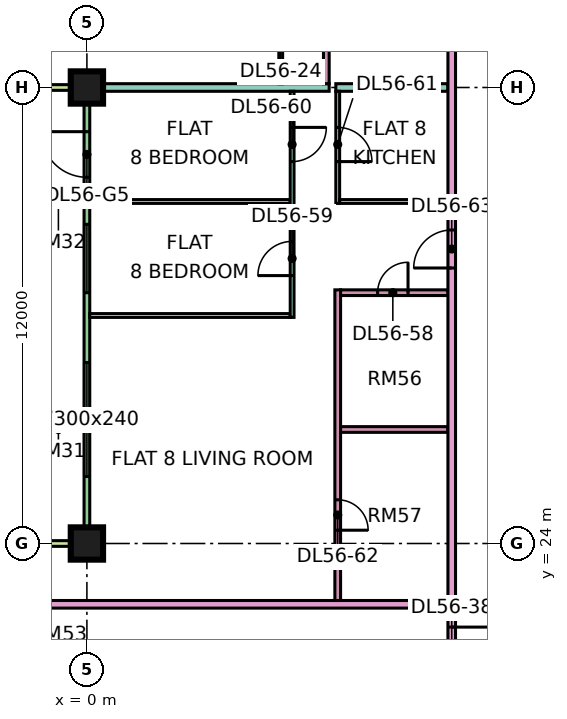
"""IFC4 building model, lengths in metres.
Left out: names, types, materials, properties, quantities, classifications, styles, units other than length and angle.
Written with IfcOpenShell. Run it as: python <this file> out.ifc"""

import sys

from ifc_helpers import new_model, si_unit, direction, frame, frame_2d, origin, origin_2d, place, context, subcontext, project, spatial, rectangle, extrude, element, fill, save


model = new_model("IFC4")
c1 = context("Model", 3, precision=1e-05, world=origin(), true_north=direction((0.0, 1.0)))
c2 = subcontext(c1, "Body", "Model", "MODEL_VIEW")
j1 = project(units=[si_unit("LENGTHUNIT", "METRE"), si_unit("PLANEANGLEUNIT", "RADIAN")], contexts=[c1])
p1 = place(None, origin())
s1 = spatial("IfcSite", under=j1, at=p1, CompositionType="ELEMENT")
p2 = place(p1, origin())
s2 = spatial("IfcBuilding", under=s1, at=p2, CompositionType="ELEMENT")
p3 = place(p2, frame((0.0, 0.0, 237.9)))
s3 = spatial("IfcBuildingStorey", under=s2, at=p3, CompositionType="ELEMENT", Elevation=237.9)
p4 = place(p3, frame((0.0, 24.0, 0.0), z_axis=(0.0, 0.0, 1.0), x_axis=(1.0, 0.0, 0.0)))
e1 = element("IfcColumn", 1, at=p4, inside=s3, PredefinedType="COLUMN", context=c2, shape_type="SweptSolid", body=[
    extrude(rectangle(XDim=0.85, YDim=0.85, at=origin_2d()), origin(), (0.0, 0.0, 1.0), 3.75),
])
p5 = place(p3, frame((0.0, 36.0, 0.0), z_axis=(0.0, 0.0, 1.0), x_axis=(1.0, 0.0, 0.0)))
e2 = element("IfcColumn", 2, at=p5, inside=s3, PredefinedType="COLUMN", context=c2, shape_type="SweptSolid", body=[
    extrude(rectangle(XDim=0.85, YDim=0.85, at=origin_2d()), origin(), (0.0, 0.0, 1.0), 3.75),
])
p6 = place(p3, frame((0.0, 35.925, 0.0), z_axis=(0.0, 0.0, 1.0), x_axis=(0.0, -1.0, 0.0)))
e3 = element("IfcWall", 3, at=p6, inside=s3, PredefinedType="SOLIDWALL", context=c2, shape_type="SweptSolid", body=[
    extrude(rectangle(XDim=11.85, YDim=0.15, at=frame_2d((5.925, 0.0))), origin(), (0.0, 0.0, 1.0), 3.35),
])
p7 = place(p6, frame((1.087, 0.0, 0.0)))
e4 = element("IfcOpeningElement", 4, at=p7, cuts=e3, PredefinedType="OPENING", context=c2, shape_type="SweptSolid", body=[
    extrude(rectangle(XDim=1.2, YDim=2.4, at=frame_2d((0.6, 1.2))), frame((0.0, 0.085, 0.0), z_axis=(0.0, -1.0, 0.0), x_axis=(1.0, 0.0, 0.0)), (0.0, 0.0, 1.0), 0.17),
])
p8 = place(p6, frame((3.525, 0.0, 0.45)))
e5 = element("IfcOpeningElement", 5, at=p8, cuts=e3, PredefinedType="OPENING", context=c2, shape_type="SweptSolid", body=[
    extrude(rectangle(XDim=1.8, YDim=2.4, at=frame_2d((0.9, 1.2))), frame((0.0, 0.085, 0.0), z_axis=(0.0, -1.0, 0.0), x_axis=(1.0, 0.0, 0.0)), (0.0, 0.0, 1.0), 0.17),
])
p9 = place(p6, frame((7.163, 0.0, 0.45)))
e6 = element("IfcOpeningElement", 6, at=p9, cuts=e3, PredefinedType="OPENING", context=c2, shape_type="SweptSolid", body=[
    extrude(rectangle(XDim=3.0, YDim=2.4, at=frame_2d((1.5, 1.2))), frame((0.0, 0.085, 0.0), z_axis=(0.0, -1.0, 0.0), x_axis=(1.0, 0.0, 0.0)), (0.0, 0.0, 1.0), 0.17),
])
for number, where, z_axis, x_axis in (
    (7, (-1.5, 36.0, 0.0), (0.0, 0.0, 1.0), (1.0, 0.0, 0.0)),
    (8, (-1.5, 24.0, 0.0), (0.0, 0.0, 1.0), (1.0, 0.0, 0.0)),
):
    element("IfcWall", number, at=place(p3, frame(where, z_axis=z_axis, x_axis=x_axis)), inside=s3, PredefinedType="SOLIDWALL", context=c2, shape_type="SweptSolid", body=[
        extrude(rectangle(XDim=1.5, YDim=0.15, at=frame_2d((0.75, 0.0))), origin(), (0.0, 0.0, 1.0), 3.35),
    ])
p10 = place(p3, frame((-1.35, 22.4, 0.0), z_axis=(0.0, 0.0, 1.0), x_axis=(1.0, 0.0, 0.0)))
e9 = element("IfcWall", 9, at=p10, inside=s3, PredefinedType="PARTITIONING", context=c2, shape_type="SweptSolid", body=[
    extrude(rectangle(XDim=10.85, YDim=0.2, at=frame_2d((5.425, 0.0))), origin(), (0.0, 0.0, 1.0), 3.35),
])
e10 = element("IfcWall", 10, at=p5, inside=s3, PredefinedType="PARTITIONING", context=c2, shape_type="SweptSolid", body=[
    extrude(rectangle(XDim=6.375, YDim=0.2, at=frame_2d((3.188, 0.0))), origin(), (0.0, 0.0, 1.0), 3.35),
])
for number, where, z_axis, x_axis in (
    (11, (0.074, 30.0, 0.0), (0.0, 0.0, 1.0), (1.0, 0.0, 0.0)),
    (12, (0.074, 33.0, 0.0), (0.0, 0.0, 1.0), (1.0, 0.0, 0.0)),
):
    element("IfcWall", number, at=place(p3, frame(where, z_axis=z_axis, x_axis=x_axis)), inside=s3, PredefinedType="PARTITIONING", context=c2, shape_type="SweptSolid", body=[
        extrude(rectangle(XDim=5.276, YDim=0.1, at=frame_2d((2.638, 0.0))), origin(), (0.0, 0.0, 1.0), 3.35),
    ])
p11 = place(p3, frame((5.1, 36.1, 0.0), z_axis=(0.0, 0.0, 1.0), x_axis=(0.0, 1.0, 0.0)))
e13 = element("IfcWall", 13, at=p11, inside=s3, PredefinedType="PARTITIONING", context=c2, shape_type="SweptSolid", body=[
    extrude(rectangle(XDim=2.85, YDim=0.1, at=frame_2d((1.425, 0.0))), origin(), (0.0, 0.0, 1.0), 3.35),
])
p12 = place(p11, frame((0.95, 0.0, 0.0)))
e14 = element("IfcOpeningElement", 14, at=p12, cuts=e13, PredefinedType="OPENING", context=c2, shape_type="SweptSolid", body=[
    extrude(rectangle(XDim=0.9, YDim=2.1, at=frame_2d((0.45, 1.05))), frame((0.0, 0.06, 0.0), z_axis=(0.0, -1.0, 0.0), x_axis=(1.0, 0.0, 0.0)), (0.0, 0.0, 1.0), 0.12),
])
p13 = place(p3, frame((5.4, 29.95, 0.0), z_axis=(0.0, 0.0, 1.0), x_axis=(0.0, 1.0, 0.0)))
e15 = element("IfcWall", 15, at=p13, inside=s3, PredefinedType="PARTITIONING", context=c2, shape_type="SweptSolid", body=[
    extrude(rectangle(XDim=5.95, YDim=0.1, at=frame_2d((2.975, 0.0))), origin(), (0.0, 0.0, 1.0), 3.35),
])
p14 = place(p13, frame((1.1, 0.0, 0.0)))
e16 = element("IfcOpeningElement", 16, at=p14, cuts=e15, PredefinedType="OPENING", context=c2, shape_type="SweptSolid", body=[
    extrude(rectangle(XDim=0.9, YDim=2.1, at=frame_2d((0.45, 1.05))), frame((0.0, 0.06, 0.0), z_axis=(0.0, -1.0, 0.0), x_axis=(1.0, 0.0, 0.0)), (0.0, 0.0, 1.0), 0.12),
])
p15 = place(p13, frame((4.1, 0.0, 0.0)))
e17 = element("IfcOpeningElement", 17, at=p15, cuts=e15, PredefinedType="OPENING", context=c2, shape_type="SweptSolid", body=[
    extrude(rectangle(XDim=0.9, YDim=2.1, at=frame_2d((0.45, 1.05))), frame((0.0, 0.06, 0.0), z_axis=(0.0, -1.0, 0.0), x_axis=(1.0, 0.0, 0.0)), (0.0, 0.0, 1.0), 0.12),
])
p16 = place(p3, frame((6.3, 36.1, 0.0), z_axis=(0.0, 0.0, 1.0), x_axis=(0.0, 1.0, 0.0)))
e18 = element("IfcWall", 18, at=p16, inside=s3, PredefinedType="PARTITIONING", context=c2, shape_type="SweptSolid", body=[
    extrude(rectangle(XDim=11.975, YDim=0.15, at=frame_2d((5.987, 0.0))), origin(), (0.0, 0.0, 1.0), 3.35),
])
p17 = place(p16, frame((6.95, 0.0, 0.0)))
e19 = element("IfcOpeningElement", 19, at=p17, cuts=e18, PredefinedType="OPENING", context=c2, shape_type="SweptSolid", body=[
    extrude(rectangle(XDim=0.8, YDim=2.1, at=frame_2d((0.4, 1.05))), frame((0.0, 0.085, 0.0), z_axis=(0.0, -1.0, 0.0), x_axis=(1.0, 0.0, 0.0)), (0.0, 0.0, 1.0), 0.17),
])
p18 = place(p16, frame((2.15, 0.0, 0.0)))
e20 = element("IfcOpeningElement", 20, at=p18, cuts=e18, PredefinedType="OPENING", context=c2, shape_type="SweptSolid", body=[
    extrude(rectangle(XDim=0.9, YDim=2.1, at=frame_2d((0.45, 1.05))), frame((0.0, 0.085, 0.0), z_axis=(0.0, -1.0, 0.0), x_axis=(1.0, 0.0, 0.0)), (0.0, 0.0, 1.0), 0.17),
])
p19 = place(p16, frame((10.25, 0.0, 0.0)))
e21 = element("IfcOpeningElement", 21, at=p19, cuts=e18, PredefinedType="OPENING", context=c2, shape_type="SweptSolid", body=[
    extrude(rectangle(XDim=0.8, YDim=2.1, at=frame_2d((0.4, 1.05))), frame((0.0, 0.085, 0.0), z_axis=(0.0, -1.0, 0.0), x_axis=(1.0, 0.0, 0.0)), (0.0, 0.0, 1.0), 0.17),
])
p20 = place(p3, frame((6.55, 36.0, 0.0), z_axis=(0.0, 0.0, 1.0), x_axis=(1.0, 0.0, 0.0)))
e22 = element("IfcWall", 22, at=p20, inside=s3, PredefinedType="PARTITIONING", context=c2, shape_type="SweptSolid", body=[
    extrude(rectangle(XDim=2.95, YDim=0.2, at=frame_2d((1.475, 0.0))), origin(), (0.0, 0.0, 1.0), 3.35),
])
p21 = place(p3, frame((6.6, 22.5, 0.0), z_axis=(0.0, 0.0, 1.0), x_axis=(0.0, 1.0, 0.0)))
e23 = element("IfcWall", 23, at=p21, inside=s3, PredefinedType="PARTITIONING", context=c2, shape_type="SweptSolid", body=[
    extrude(rectangle(XDim=8.175, YDim=0.15, at=frame_2d((4.087, 0.0))), origin(), (0.0, 0.0, 1.0), 3.35),
])
p22 = place(p21, frame((1.85, 0.0, 0.0)))
e24 = element("IfcOpeningElement", 24, at=p22, cuts=e23, PredefinedType="OPENING", context=c2, shape_type="SweptSolid", body=[
    extrude(rectangle(XDim=0.8, YDim=2.1, at=frame_2d((0.4, 1.05))), frame((0.0, 0.085, 0.0), z_axis=(0.0, -1.0, 0.0), x_axis=(1.0, 0.0, 0.0)), (0.0, 0.0, 1.0), 0.17),
])
p23 = place(p3, frame((6.6, 32.95, 0.0), z_axis=(0.0, 0.0, 1.0), x_axis=(0.0, 1.0, 0.0)))
e25 = element("IfcWall", 25, at=p23, inside=s3, PredefinedType="PARTITIONING", context=c2, shape_type="SweptSolid", body=[
    extrude(rectangle(XDim=2.95, YDim=0.1, at=frame_2d((1.475, 0.0))), origin(), (0.0, 0.0, 1.0), 3.35),
])
p24 = place(p23, frame((1.1, 0.0, 0.0)))
e26 = element("IfcOpeningElement", 26, at=p24, cuts=e25, PredefinedType="OPENING", context=c2, shape_type="SweptSolid", body=[
    extrude(rectangle(XDim=0.9, YDim=2.1, at=frame_2d((0.45, 1.05))), frame((0.0, 0.06, 0.0), z_axis=(0.0, -1.0, 0.0), x_axis=(1.0, 0.0, 0.0)), (0.0, 0.0, 1.0), 0.12),
])
p25 = place(p3, frame((6.65, 33.0, 0.0), z_axis=(0.0, 0.0, 1.0), x_axis=(1.0, 0.0, 0.0)))
e27 = element("IfcWall", 27, at=p25, inside=s3, PredefinedType="PARTITIONING", context=c2, shape_type="SweptSolid", body=[
    extrude(rectangle(XDim=2.85, YDim=0.1, at=frame_2d((1.425, 0.0))), origin(), (0.0, 0.0, 1.0), 3.35),
])
p26 = place(p3, frame((6.675, 27.0, 0.0), z_axis=(0.0, 0.0, 1.0), x_axis=(1.0, 0.0, 0.0)))
e28 = element("IfcWall", 28, at=p26, inside=s3, PredefinedType="PARTITIONING", context=c2, shape_type="SweptSolid", body=[
    extrude(rectangle(XDim=2.825, YDim=0.15, at=frame_2d((1.413, 0.0))), origin(), (0.0, 0.0, 1.0), 3.35),
])
p27 = place(p3, frame((6.675, 30.6, 0.0), z_axis=(0.0, 0.0, 1.0), x_axis=(1.0, 0.0, 0.0)))
e29 = element("IfcWall", 29, at=p27, inside=s3, PredefinedType="PARTITIONING", context=c2, shape_type="SweptSolid", body=[
    extrude(rectangle(XDim=2.825, YDim=0.15, at=frame_2d((1.413, 0.0))), origin(), (0.0, 0.0, 1.0), 3.35),
])
p28 = place(p27, frame((0.975, 0.0, 0.0)))
e30 = element("IfcOpeningElement", 30, at=p28, cuts=e29, PredefinedType="OPENING", context=c2, shape_type="SweptSolid", body=[
    extrude(rectangle(XDim=0.8, YDim=2.1, at=frame_2d((0.4, 1.05))), frame((0.0, 0.085, 0.0), z_axis=(0.0, -1.0, 0.0), x_axis=(1.0, 0.0, 0.0)), (0.0, 0.0, 1.0), 0.17),
])
p29 = place(p3, frame((9.6, 20.0, 0.0), z_axis=(0.0, 0.0, 1.0), x_axis=(0.0, 1.0, 0.0)))
e31 = element("IfcWall", 31, at=p29, inside=s3, PredefinedType="PARTITIONING", context=c2, shape_type="SweptSolid", body=[
    extrude(rectangle(XDim=42.926, YDim=0.2, at=frame_2d((21.463, 0.0))), origin(), (0.0, 0.0, 1.0), 3.35),
])
p30 = place(p29, frame((28.95, 0.0, 0.0)))
e32 = element("IfcOpeningElement", 32, at=p30, cuts=e31, PredefinedType="OPENING", context=c2, shape_type="SweptSolid", body=[
    extrude(rectangle(XDim=1.0, YDim=2.1, at=frame_2d((0.5, 1.05))), frame((0.0, 0.11, 0.0), z_axis=(0.0, -1.0, 0.0), x_axis=(1.0, 0.0, 0.0)), (0.0, 0.0, 1.0), 0.22),
])
p31 = place(p29, frame((31.95, 0.0, 0.0)))
e33 = element("IfcOpeningElement", 33, at=p31, cuts=e31, PredefinedType="OPENING", context=c2, shape_type="SweptSolid", body=[
    extrude(rectangle(XDim=1.0, YDim=2.1, at=frame_2d((0.5, 1.05))), frame((0.0, 0.11, 0.0), z_axis=(0.0, -1.0, 0.0), x_axis=(1.0, 0.0, 0.0)), (0.0, 0.0, 1.0), 0.22),
])
p32 = place(p29, frame((0.6, 0.0, 0.0)))
e34 = element("IfcOpeningElement", 34, at=p32, cuts=e31, PredefinedType="OPENING", context=c2, shape_type="SweptSolid", body=[
    extrude(rectangle(XDim=1.2, YDim=2.1, at=frame_2d((0.6, 1.05))), frame((0.0, 0.11, 0.0), z_axis=(0.0, -1.0, 0.0), x_axis=(1.0, 0.0, 0.0)), (0.0, 0.0, 1.0), 0.22),
])
p33 = place(p29, frame((11.25, 0.0, 0.0)))
e35 = element("IfcOpeningElement", 35, at=p33, cuts=e31, PredefinedType="OPENING", context=c2, shape_type="SweptSolid", body=[
    extrude(rectangle(XDim=1.0, YDim=2.1, at=frame_2d((0.5, 1.05))), frame((0.0, 0.11, 0.0), z_axis=(0.0, -1.0, 0.0), x_axis=(1.0, 0.0, 0.0)), (0.0, 0.0, 1.0), 0.22),
])
p34 = place(p7, frame((1.2, 0.0, 0.0), z_axis=(0.0, 0.0, 1.0), x_axis=(-1.0, 0.0, 0.0)))
e36 = element("IfcDoor", 36, at=p34, inside=s3, OperationType="DOUBLE_DOOR_SINGLE_SWING", PredefinedType="DOOR", context=c2, shape_type="SweptSolid", body=[
    extrude(rectangle(XDim=1.2, YDim=2.4, at=frame_2d((0.6, 1.2))), frame((0.0, 0.025, 0.0), z_axis=(0.0, -1.0, 0.0), x_axis=(1.0, 0.0, 0.0)), (0.0, 0.0, 1.0), 0.05),
])
fill(e4, e36)
p35 = place(p8, origin())
e37 = element("IfcWindow", 37, at=p35, inside=s3, PartitioningType="SINGLE_PANEL", PredefinedType="WINDOW", context=c2, shape_type="SweptSolid", body=[
    extrude(rectangle(XDim=1.8, YDim=2.4, at=frame_2d((0.9, 1.2))), frame((0.0, 0.03, 0.0), z_axis=(0.0, -1.0, 0.0), x_axis=(1.0, 0.0, 0.0)), (0.0, 0.0, 1.0), 0.06),
])
fill(e5, e37)
p36 = place(p9, origin())
e38 = element("IfcWindow", 38, at=p36, inside=s3, PartitioningType="SINGLE_PANEL", PredefinedType="WINDOW", context=c2, shape_type="SweptSolid", body=[
    extrude(rectangle(XDim=3.0, YDim=2.4, at=frame_2d((1.5, 1.2))), frame((0.0, 0.03, 0.0), z_axis=(0.0, -1.0, 0.0), x_axis=(1.0, 0.0, 0.0)), (0.0, 0.0, 1.0), 0.06),
])
fill(e6, e38)
p37 = place(p32, origin())
e39 = element("IfcDoor", 39, at=p37, inside=s3, OperationType="SINGLE_SWING_RIGHT", PredefinedType="DOOR", context=c2, shape_type="SweptSolid", body=[
    extrude(rectangle(XDim=1.2, YDim=2.1, at=frame_2d((0.6, 1.05))), frame((0.0, 0.025, 0.0), z_axis=(0.0, -1.0, 0.0), x_axis=(1.0, 0.0, 0.0)), (0.0, 0.0, 1.0), 0.05),
])
fill(e34, e39)
p38 = place(p28, frame((0.8, 0.0, 0.0), z_axis=(0.0, 0.0, 1.0), x_axis=(-1.0, 0.0, 0.0)))
e40 = element("IfcDoor", 40, at=p38, inside=s3, OperationType="SINGLE_SWING_RIGHT", PredefinedType="DOOR", context=c2, shape_type="SweptSolid", body=[
    extrude(rectangle(XDim=0.8, YDim=2.1, at=frame_2d((0.4, 1.05))), frame((0.0, 0.025, 0.0), z_axis=(0.0, -1.0, 0.0), x_axis=(1.0, 0.0, 0.0)), (0.0, 0.0, 1.0), 0.05),
])
fill(e30, e40)
p39 = place(p14, origin())
e41 = element("IfcDoor", 41, at=p39, inside=s3, OperationType="SINGLE_SWING_LEFT", PredefinedType="DOOR", context=c2, shape_type="SweptSolid", body=[
    extrude(rectangle(XDim=0.9, YDim=2.1, at=frame_2d((0.45, 1.05))), frame((0.0, 0.025, 0.0), z_axis=(0.0, -1.0, 0.0), x_axis=(1.0, 0.0, 0.0)), (0.0, 0.0, 1.0), 0.05),
])
fill(e16, e41)
p40 = place(p15, origin())
e42 = element("IfcDoor", 42, at=p40, inside=s3, OperationType="SINGLE_SWING_RIGHT", PredefinedType="DOOR", context=c2, shape_type="SweptSolid", body=[
    extrude(rectangle(XDim=0.9, YDim=2.1, at=frame_2d((0.45, 1.05))), frame((0.0, 0.025, 0.0), z_axis=(0.0, -1.0, 0.0), x_axis=(1.0, 0.0, 0.0)), (0.0, 0.0, 1.0), 0.05),
])
fill(e17, e42)
p41 = place(p24, frame((0.9, 0.0, 0.0), z_axis=(0.0, 0.0, 1.0), x_axis=(-1.0, 0.0, 0.0)))
e43 = element("IfcDoor", 43, at=p41, inside=s3, OperationType="SINGLE_SWING_LEFT", PredefinedType="DOOR", context=c2, shape_type="SweptSolid", body=[
    extrude(rectangle(XDim=0.9, YDim=2.1, at=frame_2d((0.45, 1.05))), frame((0.0, 0.025, 0.0), z_axis=(0.0, -1.0, 0.0), x_axis=(1.0, 0.0, 0.0)), (0.0, 0.0, 1.0), 0.05),
])
fill(e26, e43)
p42 = place(p22, frame((0.8, 0.0, 0.0), z_axis=(0.0, 0.0, 1.0), x_axis=(-1.0, 0.0, 0.0)))
e44 = element("IfcDoor", 44, at=p42, inside=s3, OperationType="SINGLE_SWING_LEFT", PredefinedType="DOOR", context=c2, shape_type="SweptSolid", body=[
    extrude(rectangle(XDim=0.8, YDim=2.1, at=frame_2d((0.4, 1.05))), frame((0.0, 0.025, 0.0), z_axis=(0.0, -1.0, 0.0), x_axis=(1.0, 0.0, 0.0)), (0.0, 0.0, 1.0), 0.05),
])
fill(e24, e44)
p43 = place(p33, origin())
e45 = element("IfcDoor", 45, at=p43, inside=s3, OperationType="SINGLE_SWING_LEFT", PredefinedType="DOOR", context=c2, shape_type="SweptSolid", body=[
    extrude(rectangle(XDim=1.0, YDim=2.1, at=frame_2d((0.5, 1.05))), frame((0.0, 0.025, 0.0), z_axis=(0.0, -1.0, 0.0), x_axis=(1.0, 0.0, 0.0)), (0.0, 0.0, 1.0), 0.05),
])
fill(e35, e45)
save(model, sys.argv[1])
